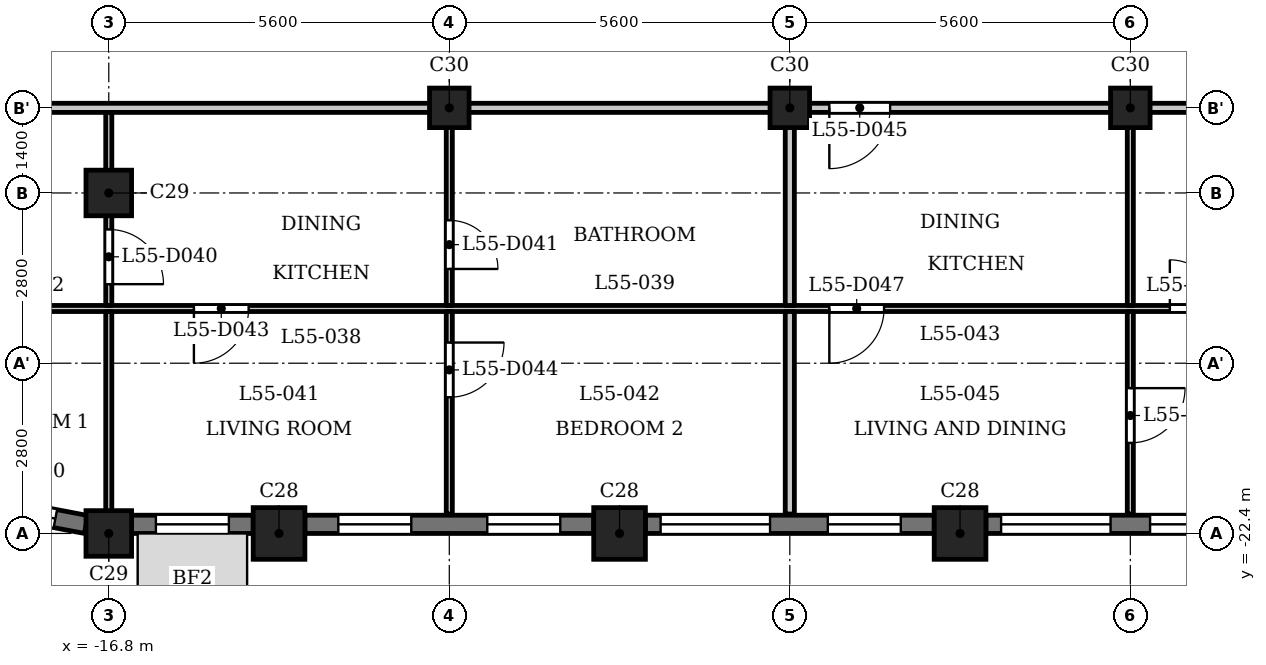
"""IFC4 building model, lengths in metres.
Left out: names, types, materials, properties, quantities, classifications, styles, units other than length and angle.
Written with IfcOpenShell. Run it as: python <this file> out.ifc"""

import sys

from ifc_helpers import new_model, si_unit, direction, frame, frame_2d, origin, origin_2d, place, context, subcontext, project, spatial, rectangle, extrude, element, fill, save


model = new_model("IFC4")
c1 = context("Model", 3, precision=1e-05, world=origin(), true_north=direction((0.0, 1.0)))
c2 = subcontext(c1, "Body", "Model", "MODEL_VIEW")
j1 = project(units=[si_unit("LENGTHUNIT", "METRE"), si_unit("PLANEANGLEUNIT", "RADIAN")], contexts=[c1])
p1 = place(None, origin())
s1 = spatial("IfcSite", under=j1, at=p1, CompositionType="ELEMENT")
p2 = place(p1, origin())
s2 = spatial("IfcBuilding", under=s1, at=p2, CompositionType="ELEMENT")
p3 = place(p2, frame((0.0, 0.0, 213.4)))
s3 = spatial("IfcBuildingStorey", under=s2, at=p3, CompositionType="ELEMENT", Elevation=213.4)
for number, where, z_axis, x_axis in (
    (1, (-14.0, -22.4, 0.0), (0.0, 0.0, 1.0), (1.0, 0.0, 0.0)),
    (2, (-8.4, -22.4, 0.0), (0.0, 0.0, 1.0), (1.0, 0.0, 0.0)),
    (3, (-2.8, -22.4, 0.0), (0.0, 0.0, 1.0), (1.0, 0.0, 0.0)),
):
    element("IfcColumn", number, at=place(p3, frame(where, z_axis=z_axis, x_axis=x_axis)), inside=s3, PredefinedType="COLUMN", context=c2, shape_type="SweptSolid", body=[
        extrude(rectangle(XDim=0.85, YDim=0.85, at=origin_2d()), origin(), (0.0, 0.0, 1.0), 3.5),
    ])
for number, where, z_axis, x_axis in (
    (4, (-16.8, -22.4, 0.0), (0.0, 0.0, 1.0), (1.0, 0.0, 0.0)),
    (5, (-16.8, -16.8, 0.0), (0.0, 0.0, 1.0), (1.0, 0.0, 0.0)),
):
    element("IfcColumn", number, at=place(p3, frame(where, z_axis=z_axis, x_axis=x_axis)), inside=s3, PredefinedType="COLUMN", context=c2, shape_type="SweptSolid", body=[
        extrude(rectangle(XDim=0.75, YDim=0.75, at=origin_2d()), origin(), (0.0, 0.0, 1.0), 3.5),
    ])
for number, where, z_axis, x_axis in (
    (6, (-11.2, -15.4, 0.0), (0.0, 0.0, 1.0), (1.0, 0.0, 0.0)),
    (7, (-5.6, -15.4, 0.0), (0.0, 0.0, 1.0), (1.0, 0.0, 0.0)),
    (8, (0.0, -15.4, 0.0), (0.0, 0.0, 1.0), (1.0, 0.0, 0.0)),
):
    element("IfcColumn", number, at=place(p3, frame(where, z_axis=z_axis, x_axis=x_axis)), inside=s3, PredefinedType="COLUMN", context=c2, shape_type="SweptSolid", body=[
        extrude(rectangle(XDim=0.65, YDim=0.65, at=origin_2d()), origin(), (0.0, 0.0, 1.0), 3.5),
    ])
p4 = place(p3, frame((-18.971, -21.91, 0.0), z_axis=(0.0, 0.0, 1.0), x_axis=(0.982300037503, -0.187314271538, 0.0)))
e9 = element("IfcWall", 9, at=p4, inside=s3, PredefinedType="SOLIDWALL", context=c2, shape_type="SweptSolid", body=[
    extrude(rectangle(XDim=1.831, YDim=0.3, at=frame_2d((0.916, 0.0))), origin(), (0.0, 0.0, 1.0), 2.5),
])
p5 = place(p4, frame((0.516, 0.0, 0.6)))
e10 = element("IfcOpeningElement", 10, at=p5, cuts=e9, PredefinedType="OPENING", context=c2, shape_type="SweptSolid", body=[
    extrude(rectangle(XDim=0.8, YDim=1.55, at=frame_2d((0.4, 0.775))), frame((0.0, 0.16, 0.0), z_axis=(0.0, -1.0, 0.0), x_axis=(1.0, 0.0, 0.0)), (0.0, 0.0, 1.0), 0.32),
])
p6 = place(p3, frame((-16.425, -22.25, 0.0), z_axis=(0.0, 0.0, 1.0), x_axis=(1.0, 0.0, 0.0)))
e11 = element("IfcWall", 11, at=p6, inside=s3, PredefinedType="SOLIDWALL", context=c2, shape_type="SweptSolid", body=[
    extrude(rectangle(XDim=2.0, YDim=0.3, at=frame_2d((1.0, 0.0))), origin(), (0.0, 0.0, 1.0), 2.5),
])
p7 = place(p6, frame((0.4, 0.0, 0.6)))
e12 = element("IfcOpeningElement", 12, at=p7, cuts=e11, PredefinedType="OPENING", context=c2, shape_type="SweptSolid", body=[
    extrude(rectangle(XDim=1.2, YDim=1.55, at=frame_2d((0.6, 0.775))), frame((0.0, 0.16, 0.0), z_axis=(0.0, -1.0, 0.0), x_axis=(1.0, 0.0, 0.0)), (0.0, 0.0, 1.0), 0.32),
])
p8 = place(p3, frame((-13.575, -22.25, 0.0), z_axis=(0.0, 0.0, 1.0), x_axis=(1.0, 0.0, 0.0)))
e13 = element("IfcWall", 13, at=p8, inside=s3, PredefinedType="SOLIDWALL", context=c2, shape_type="SweptSolid", body=[
    extrude(rectangle(XDim=4.75, YDim=0.3, at=frame_2d((2.375, 0.0))), origin(), (0.0, 0.0, 1.0), 2.5),
])
p9 = place(p8, frame((0.55, 0.0, 0.6)))
e14 = element("IfcOpeningElement", 14, at=p9, cuts=e13, PredefinedType="OPENING", context=c2, shape_type="SweptSolid", body=[
    extrude(rectangle(XDim=1.2, YDim=1.55, at=frame_2d((0.6, 0.775))), frame((0.0, 0.16, 0.0), z_axis=(0.0, -1.0, 0.0), x_axis=(1.0, 0.0, 0.0)), (0.0, 0.0, 1.0), 0.32),
])
p10 = place(p8, frame((3.0, 0.0, 0.6)))
e15 = element("IfcOpeningElement", 15, at=p10, cuts=e13, PredefinedType="OPENING", context=c2, shape_type="SweptSolid", body=[
    extrude(rectangle(XDim=1.2, YDim=1.55, at=frame_2d((0.6, 0.775))), frame((0.0, 0.16, 0.0), z_axis=(0.0, -1.0, 0.0), x_axis=(1.0, 0.0, 0.0)), (0.0, 0.0, 1.0), 0.32),
])
p11 = place(p3, frame((-7.975, -22.25, 0.0), z_axis=(0.0, 0.0, 1.0), x_axis=(1.0, 0.0, 0.0)))
e16 = element("IfcWall", 16, at=p11, inside=s3, PredefinedType="SOLIDWALL", context=c2, shape_type="SweptSolid", body=[
    extrude(rectangle(XDim=4.75, YDim=0.3, at=frame_2d((2.375, 0.0))), origin(), (0.0, 0.0, 1.0), 2.5),
])
p12 = place(p11, frame((0.25, 0.0, 0.9)))
e17 = element("IfcOpeningElement", 17, at=p12, cuts=e16, PredefinedType="OPENING", context=c2, shape_type="SweptSolid", body=[
    extrude(rectangle(XDim=1.8, YDim=1.25, at=frame_2d((0.9, 0.625))), frame((0.0, 0.16, 0.0), z_axis=(0.0, -1.0, 0.0), x_axis=(1.0, 0.0, 0.0)), (0.0, 0.0, 1.0), 0.32),
])
p13 = place(p11, frame((3.0, 0.0, 0.6)))
e18 = element("IfcOpeningElement", 18, at=p13, cuts=e16, PredefinedType="OPENING", context=c2, shape_type="SweptSolid", body=[
    extrude(rectangle(XDim=1.2, YDim=1.55, at=frame_2d((0.6, 0.775))), frame((0.0, 0.16, 0.0), z_axis=(0.0, -1.0, 0.0), x_axis=(1.0, 0.0, 0.0)), (0.0, 0.0, 1.0), 0.32),
])
p14 = place(p3, frame((-2.375, -22.25, 0.0), z_axis=(0.0, 0.0, 1.0), x_axis=(1.0, 0.0, 0.0)))
e19 = element("IfcWall", 19, at=p14, inside=s3, PredefinedType="SOLIDWALL", context=c2, shape_type="SweptSolid", body=[
    extrude(rectangle(XDim=4.75, YDim=0.3, at=frame_2d((2.375, 0.0))), origin(), (0.0, 0.0, 1.0), 2.5),
])
p15 = place(p14, frame((0.25, 0.0, 0.9)))
e20 = element("IfcOpeningElement", 20, at=p15, cuts=e19, PredefinedType="OPENING", context=c2, shape_type="SweptSolid", body=[
    extrude(rectangle(XDim=1.8, YDim=1.25, at=frame_2d((0.9, 0.625))), frame((0.0, 0.16, 0.0), z_axis=(0.0, -1.0, 0.0), x_axis=(1.0, 0.0, 0.0)), (0.0, 0.0, 1.0), 0.32),
])
p16 = place(p14, frame((2.7, 0.0, 0.9)))
e21 = element("IfcOpeningElement", 21, at=p16, cuts=e19, PredefinedType="OPENING", context=c2, shape_type="SweptSolid", body=[
    extrude(rectangle(XDim=1.8, YDim=1.25, at=frame_2d((0.9, 0.625))), frame((0.0, 0.16, 0.0), z_axis=(0.0, -1.0, 0.0), x_axis=(1.0, 0.0, 0.0)), (0.0, 0.0, 1.0), 0.32),
])
p17 = place(p3, frame((-22.856, -18.7, 0.0), z_axis=(0.0, 0.0, 1.0), x_axis=(1.0, 0.0, 0.0)))
e22 = element("IfcWall", 22, at=p17, inside=s3, PredefinedType="PARTITIONING", context=c2, shape_type="SweptSolid", body=[
    extrude(rectangle(XDim=45.711, YDim=0.1, at=frame_2d((22.856, 0.0))), origin(), (0.0, 0.0, 1.0), 3.2),
])
p18 = place(p17, frame((4.084, 0.0, 0.0)))
e23 = element("IfcOpeningElement", 23, at=p18, cuts=e22, PredefinedType="OPENING", context=c2, shape_type="SweptSolid", body=[
    extrude(rectangle(XDim=0.9, YDim=2.1, at=frame_2d((0.45, 1.05))), frame((0.0, 0.06, 0.0), z_axis=(0.0, -1.0, 0.0), x_axis=(1.0, 0.0, 0.0)), (0.0, 0.0, 1.0), 0.12),
])
p19 = place(p17, frame((7.456, 0.0, 0.0)))
e24 = element("IfcOpeningElement", 24, at=p19, cuts=e22, PredefinedType="OPENING", context=c2, shape_type="SweptSolid", body=[
    extrude(rectangle(XDim=0.9, YDim=2.1, at=frame_2d((0.45, 1.05))), frame((0.0, 0.06, 0.0), z_axis=(0.0, -1.0, 0.0), x_axis=(1.0, 0.0, 0.0)), (0.0, 0.0, 1.0), 0.12),
])
p20 = place(p17, frame((23.506, 0.0, 0.0)))
e25 = element("IfcOpeningElement", 25, at=p20, cuts=e22, PredefinedType="OPENING", context=c2, shape_type="SweptSolid", body=[
    extrude(rectangle(XDim=0.8, YDim=2.1, at=frame_2d((0.4, 1.05))), frame((0.0, 0.06, 0.0), z_axis=(0.0, -1.0, 0.0), x_axis=(1.0, 0.0, 0.0)), (0.0, 0.0, 1.0), 0.12),
])
p21 = place(p17, frame((17.906, 0.0, 0.0)))
e26 = element("IfcOpeningElement", 26, at=p21, cuts=e22, PredefinedType="OPENING", context=c2, shape_type="SweptSolid", body=[
    extrude(rectangle(XDim=0.9, YDim=2.1, at=frame_2d((0.45, 1.05))), frame((0.0, 0.06, 0.0), z_axis=(0.0, -1.0, 0.0), x_axis=(1.0, 0.0, 0.0)), (0.0, 0.0, 1.0), 0.12),
])
p22 = place(p17, frame((43.806, 0.0, 0.0)))
e27 = element("IfcOpeningElement", 27, at=p22, cuts=e22, PredefinedType="OPENING", context=c2, shape_type="SweptSolid", body=[
    extrude(rectangle(XDim=0.9, YDim=2.1, at=frame_2d((0.45, 1.05))), frame((0.0, 0.06, 0.0), z_axis=(0.0, -1.0, 0.0), x_axis=(1.0, 0.0, 0.0)), (0.0, 0.0, 1.0), 0.12),
])
p23 = place(p17, frame((34.706, 0.0, 0.0)))
e28 = element("IfcOpeningElement", 28, at=p23, cuts=e22, PredefinedType="OPENING", context=c2, shape_type="SweptSolid", body=[
    extrude(rectangle(XDim=0.9, YDim=2.1, at=frame_2d((0.45, 1.05))), frame((0.0, 0.06, 0.0), z_axis=(0.0, -1.0, 0.0), x_axis=(1.0, 0.0, 0.0)), (0.0, 0.0, 1.0), 0.12),
])
p24 = place(p3, frame((-24.684, -15.4, 0.0), z_axis=(0.0, 0.0, 1.0), x_axis=(1.0, 0.0, 0.0)))
e29 = element("IfcWall", 29, at=p24, inside=s3, PredefinedType="PARTITIONING", context=c2, shape_type="SweptSolid", body=[
    extrude(rectangle(XDim=49.368, YDim=0.15, at=frame_2d((24.684, 0.0))), origin(), (0.0, 0.0, 1.0), 3.2),
])
p25 = place(p24, frame((1.143, 0.0, 0.0)))
e30 = element("IfcOpeningElement", 30, at=p25, cuts=e29, PredefinedType="OPENING", context=c2, shape_type="SweptSolid", body=[
    extrude(rectangle(XDim=1.0, YDim=2.1, at=frame_2d((0.5, 1.05))), frame((0.0, 0.085, 0.0), z_axis=(0.0, -1.0, 0.0), x_axis=(1.0, 0.0, 0.0)), (0.0, 0.0, 1.0), 0.17),
])
p26 = place(p24, frame((19.734, 0.0, 0.0)))
e31 = element("IfcOpeningElement", 31, at=p26, cuts=e29, PredefinedType="OPENING", context=c2, shape_type="SweptSolid", body=[
    extrude(rectangle(XDim=1.0, YDim=2.1, at=frame_2d((0.5, 1.05))), frame((0.0, 0.085, 0.0), z_axis=(0.0, -1.0, 0.0), x_axis=(1.0, 0.0, 0.0)), (0.0, 0.0, 1.0), 0.17),
])
p27 = place(p24, frame((42.134, 0.0, 0.0)))
e32 = element("IfcOpeningElement", 32, at=p27, cuts=e29, PredefinedType="OPENING", context=c2, shape_type="SweptSolid", body=[
    extrude(rectangle(XDim=1.0, YDim=2.1, at=frame_2d((0.5, 1.05))), frame((0.0, 0.085, 0.0), z_axis=(0.0, -1.0, 0.0), x_axis=(1.0, 0.0, 0.0)), (0.0, 0.0, 1.0), 0.17),
])
p28 = place(p3, frame((-16.8, -22.31, 0.0), z_axis=(0.0, 0.0, 1.0), x_axis=(0.0, 1.0, 0.0)))
e33 = element("IfcWall", 33, at=p28, inside=s3, PredefinedType="PARTITIONING", context=c2, shape_type="SweptSolid", body=[
    extrude(rectangle(XDim=3.56, YDim=0.1, at=frame_2d((1.78, 0.0))), origin(), (0.0, 0.0, 1.0), 2.55),
])
p29 = place(p3, frame((-16.8, -18.65, 0.0), z_axis=(0.0, 0.0, 1.0), x_axis=(0.0, 1.0, 0.0)))
e34 = element("IfcWall", 34, at=p29, inside=s3, PredefinedType="PARTITIONING", context=c2, shape_type="SweptSolid", body=[
    extrude(rectangle(XDim=3.175, YDim=0.1, at=frame_2d((1.587, 0.0))), origin(), (0.0, 0.0, 1.0), 2.55),
])
p30 = place(p29, frame((0.35, 0.0, 0.0)))
e35 = element("IfcOpeningElement", 35, at=p30, cuts=e34, PredefinedType="OPENING", context=c2, shape_type="SweptSolid", body=[
    extrude(rectangle(XDim=0.9, YDim=2.1, at=frame_2d((0.45, 1.05))), frame((0.0, 0.06, 0.0), z_axis=(0.0, -1.0, 0.0), x_axis=(1.0, 0.0, 0.0)), (0.0, 0.0, 1.0), 0.12),
])
p31 = place(p3, frame((-11.2, -22.08, 0.0), z_axis=(0.0, 0.0, 1.0), x_axis=(0.0, 1.0, 0.0)))
e36 = element("IfcWall", 36, at=p31, inside=s3, PredefinedType="PARTITIONING", context=c2, shape_type="SweptSolid", body=[
    extrude(rectangle(XDim=3.33, YDim=0.1, at=frame_2d((1.665, 0.0))), origin(), (0.0, 0.0, 1.0), 3.2),
])
p32 = place(p31, frame((1.92, 0.0, 0.0)))
e37 = element("IfcOpeningElement", 37, at=p32, cuts=e36, PredefinedType="OPENING", context=c2, shape_type="SweptSolid", body=[
    extrude(rectangle(XDim=0.9, YDim=2.1, at=frame_2d((0.45, 1.05))), frame((0.0, 0.06, 0.0), z_axis=(0.0, -1.0, 0.0), x_axis=(1.0, 0.0, 0.0)), (0.0, 0.0, 1.0), 0.12),
])
p33 = place(p3, frame((-11.2, -18.65, 0.0), z_axis=(0.0, 0.0, 1.0), x_axis=(0.0, 1.0, 0.0)))
e38 = element("IfcWall", 38, at=p33, inside=s3, PredefinedType="PARTITIONING", context=c2, shape_type="SweptSolid", body=[
    extrude(rectangle(XDim=3.175, YDim=0.1, at=frame_2d((1.587, 0.0))), origin(), (0.0, 0.0, 1.0), 3.2),
])
p34 = place(p33, frame((0.6, 0.0, 0.0)))
e39 = element("IfcOpeningElement", 39, at=p34, cuts=e38, PredefinedType="OPENING", context=c2, shape_type="SweptSolid", body=[
    extrude(rectangle(XDim=0.8, YDim=2.1, at=frame_2d((0.4, 1.05))), frame((0.0, 0.06, 0.0), z_axis=(0.0, -1.0, 0.0), x_axis=(1.0, 0.0, 0.0)), (0.0, 0.0, 1.0), 0.12),
])
p35 = place(p3, frame((-5.6, -22.08, 0.0), z_axis=(0.0, 0.0, 1.0), x_axis=(0.0, 1.0, 0.0)))
e40 = element("IfcWall", 40, at=p35, inside=s3, PredefinedType="PARTITIONING", context=c2, shape_type="SweptSolid", body=[
    extrude(rectangle(XDim=3.33, YDim=0.15, at=frame_2d((1.665, 0.0))), origin(), (0.0, 0.0, 1.0), 3.2),
])
p36 = place(p3, frame((-5.6, -18.65, 0.0), z_axis=(0.0, 0.0, 1.0), x_axis=(0.0, 1.0, 0.0)))
e41 = element("IfcWall", 41, at=p36, inside=s3, PredefinedType="PARTITIONING", context=c2, shape_type="SweptSolid", body=[
    extrude(rectangle(XDim=3.175, YDim=0.15, at=frame_2d((1.587, 0.0))), origin(), (0.0, 0.0, 1.0), 3.2),
])
p37 = place(p3, frame((0.0, -22.08, 0.0), z_axis=(0.0, 0.0, 1.0), x_axis=(0.0, 1.0, 0.0)))
e42 = element("IfcWall", 42, at=p37, inside=s3, PredefinedType="PARTITIONING", context=c2, shape_type="SweptSolid", body=[
    extrude(rectangle(XDim=3.33, YDim=0.1, at=frame_2d((1.665, 0.0))), origin(), (0.0, 0.0, 1.0), 3.2),
])
p38 = place(p37, frame((1.17, 0.0, 0.0)))
e43 = element("IfcOpeningElement", 43, at=p38, cuts=e42, PredefinedType="OPENING", context=c2, shape_type="SweptSolid", body=[
    extrude(rectangle(XDim=0.9, YDim=2.1, at=frame_2d((0.45, 1.05))), frame((0.0, 0.06, 0.0), z_axis=(0.0, -1.0, 0.0), x_axis=(1.0, 0.0, 0.0)), (0.0, 0.0, 1.0), 0.12),
])
p39 = place(p3, frame((0.0, -18.65, 0.0), z_axis=(0.0, 0.0, 1.0), x_axis=(0.0, 1.0, 0.0)))
e44 = element("IfcWall", 44, at=p39, inside=s3, PredefinedType="PARTITIONING", context=c2, shape_type="SweptSolid", body=[
    extrude(rectangle(XDim=3.175, YDim=0.1, at=frame_2d((1.587, 0.0))), origin(), (0.0, 0.0, 1.0), 3.2),
])
p40 = place(p30, origin())
e45 = element("IfcDoor", 45, at=p40, inside=s3, OperationType="SINGLE_SWING_LEFT", PredefinedType="DOOR", context=c2, shape_type="SweptSolid", body=[
    extrude(rectangle(XDim=0.9, YDim=2.1, at=frame_2d((0.45, 1.05))), frame((0.0, 0.025, 0.0), z_axis=(0.0, -1.0, 0.0), x_axis=(1.0, 0.0, 0.0)), (0.0, 0.0, 1.0), 0.05),
])
fill(e35, e45)
p41 = place(p34, origin())
e46 = element("IfcDoor", 46, at=p41, inside=s3, OperationType="SINGLE_SWING_LEFT", PredefinedType="DOOR", context=c2, shape_type="SweptSolid", body=[
    extrude(rectangle(XDim=0.8, YDim=2.1, at=frame_2d((0.4, 1.05))), frame((0.0, 0.025, 0.0), z_axis=(0.0, -1.0, 0.0), x_axis=(1.0, 0.0, 0.0)), (0.0, 0.0, 1.0), 0.05),
])
fill(e39, e46)
p42 = place(p19, origin())
e47 = element("IfcDoor", 47, at=p42, inside=s3, OperationType="SINGLE_SWING_LEFT", PredefinedType="DOOR", context=c2, shape_type="SweptSolid", body=[
    extrude(rectangle(XDim=0.9, YDim=2.1, at=frame_2d((0.45, 1.05))), frame((0.0, 0.025, 0.0), z_axis=(0.0, -1.0, 0.0), x_axis=(1.0, 0.0, 0.0)), (0.0, 0.0, 1.0), 0.05),
])
fill(e24, e47)
p43 = place(p32, origin())
e48 = element("IfcDoor", 48, at=p43, inside=s3, OperationType="SINGLE_SWING_RIGHT", PredefinedType="DOOR", context=c2, shape_type="SweptSolid", body=[
    extrude(rectangle(XDim=0.9, YDim=2.1, at=frame_2d((0.45, 1.05))), frame((0.0, 0.025, 0.0), z_axis=(0.0, -1.0, 0.0), x_axis=(1.0, 0.0, 0.0)), (0.0, 0.0, 1.0), 0.05),
])
fill(e37, e48)
p44 = place(p26, origin())
e49 = element("IfcDoor", 49, at=p44, inside=s3, OperationType="SINGLE_SWING_LEFT", PredefinedType="DOOR", context=c2, shape_type="SweptSolid", body=[
    extrude(rectangle(XDim=1.0, YDim=2.1, at=frame_2d((0.5, 1.05))), frame((0.0, 0.025, 0.0), z_axis=(0.0, -1.0, 0.0), x_axis=(1.0, 0.0, 0.0)), (0.0, 0.0, 1.0), 0.05),
])
fill(e31, e49)
p45 = place(p20, origin())
e50 = element("IfcDoor", 50, at=p45, inside=s3, OperationType="SINGLE_SWING_RIGHT", PredefinedType="DOOR", context=c2, shape_type="SweptSolid", body=[
    extrude(rectangle(XDim=0.8, YDim=2.1, at=frame_2d((0.4, 1.05))), frame((0.0, 0.025, 0.0), z_axis=(0.0, -1.0, 0.0), x_axis=(1.0, 0.0, 0.0)), (0.0, 0.0, 1.0), 0.05),
])
fill(e25, e50)
p46 = place(p21, origin())
e51 = element("IfcDoor", 51, at=p46, inside=s3, OperationType="SINGLE_SWING_LEFT", PredefinedType="DOOR", context=c2, shape_type="SweptSolid", body=[
    extrude(rectangle(XDim=0.9, YDim=2.1, at=frame_2d((0.45, 1.05))), frame((0.0, 0.025, 0.0), z_axis=(0.0, -1.0, 0.0), x_axis=(1.0, 0.0, 0.0)), (0.0, 0.0, 1.0), 0.05),
])
fill(e26, e51)
p47 = place(p38, origin())
e52 = element("IfcDoor", 52, at=p47, inside=s3, OperationType="SINGLE_SWING_RIGHT", PredefinedType="DOOR", context=c2, shape_type="SweptSolid", body=[
    extrude(rectangle(XDim=0.9, YDim=2.1, at=frame_2d((0.45, 1.05))), frame((0.0, 0.025, 0.0), z_axis=(0.0, -1.0, 0.0), x_axis=(1.0, 0.0, 0.0)), (0.0, 0.0, 1.0), 0.05),
])
fill(e43, e52)
p48 = place(p5, origin())
e53 = element("IfcWindow", 53, at=p48, inside=s3, PartitioningType="SINGLE_PANEL", PredefinedType="WINDOW", context=c2, shape_type="SweptSolid", body=[
    extrude(rectangle(XDim=0.8, YDim=1.55, at=frame_2d((0.4, 0.775))), frame((0.0, 0.03, 0.0), z_axis=(0.0, -1.0, 0.0), x_axis=(1.0, 0.0, 0.0)), (0.0, 0.0, 1.0), 0.06),
])
fill(e10, e53)
p49 = place(p7, origin())
e54 = element("IfcWindow", 54, at=p49, inside=s3, PartitioningType="SINGLE_PANEL", PredefinedType="WINDOW", context=c2, shape_type="SweptSolid", body=[
    extrude(rectangle(XDim=1.2, YDim=1.55, at=frame_2d((0.6, 0.775))), frame((0.0, 0.03, 0.0), z_axis=(0.0, -1.0, 0.0), x_axis=(1.0, 0.0, 0.0)), (0.0, 0.0, 1.0), 0.06),
])
fill(e12, e54)
p50 = place(p9, origin())
e55 = element("IfcWindow", 55, at=p50, inside=s3, PartitioningType="SINGLE_PANEL", PredefinedType="WINDOW", context=c2, shape_type="SweptSolid", body=[
    extrude(rectangle(XDim=1.2, YDim=1.55, at=frame_2d((0.6, 0.775))), frame((0.0, 0.03, 0.0), z_axis=(0.0, -1.0, 0.0), x_axis=(1.0, 0.0, 0.0)), (0.0, 0.0, 1.0), 0.06),
])
fill(e14, e55)
p51 = place(p10, origin())
e56 = element("IfcWindow", 56, at=p51, inside=s3, PartitioningType="SINGLE_PANEL", PredefinedType="WINDOW", context=c2, shape_type="SweptSolid", body=[
    extrude(rectangle(XDim=1.2, YDim=1.55, at=frame_2d((0.6, 0.775))), frame((0.0, 0.03, 0.0), z_axis=(0.0, -1.0, 0.0), x_axis=(1.0, 0.0, 0.0)), (0.0, 0.0, 1.0), 0.06),
])
fill(e15, e56)
p52 = place(p12, origin())
e57 = element("IfcWindow", 57, at=p52, inside=s3, PartitioningType="SINGLE_PANEL", PredefinedType="WINDOW", context=c2, shape_type="SweptSolid", body=[
    extrude(rectangle(XDim=1.8, YDim=1.25, at=frame_2d((0.9, 0.625))), frame((0.0, 0.03, 0.0), z_axis=(0.0, -1.0, 0.0), x_axis=(1.0, 0.0, 0.0)), (0.0, 0.0, 1.0), 0.06),
])
fill(e17, e57)
p53 = place(p13, origin())
e58 = element("IfcWindow", 58, at=p53, inside=s3, PartitioningType="SINGLE_PANEL", PredefinedType="WINDOW", context=c2, shape_type="SweptSolid", body=[
    extrude(rectangle(XDim=1.2, YDim=1.55, at=frame_2d((0.6, 0.775))), frame((0.0, 0.03, 0.0), z_axis=(0.0, -1.0, 0.0), x_axis=(1.0, 0.0, 0.0)), (0.0, 0.0, 1.0), 0.06),
])
fill(e18, e58)
p54 = place(p15, origin())
e59 = element("IfcWindow", 59, at=p54, inside=s3, PartitioningType="SINGLE_PANEL", PredefinedType="WINDOW", context=c2, shape_type="SweptSolid", body=[
    extrude(rectangle(XDim=1.8, YDim=1.25, at=frame_2d((0.9, 0.625))), frame((0.0, 0.03, 0.0), z_axis=(0.0, -1.0, 0.0), x_axis=(1.0, 0.0, 0.0)), (0.0, 0.0, 1.0), 0.06),
])
fill(e20, e59)
p55 = place(p16, origin())
e60 = element("IfcWindow", 60, at=p55, inside=s3, PartitioningType="SINGLE_PANEL", PredefinedType="WINDOW", context=c2, shape_type="SweptSolid", body=[
    extrude(rectangle(XDim=1.8, YDim=1.25, at=frame_2d((0.9, 0.625))), frame((0.0, 0.03, 0.0), z_axis=(0.0, -1.0, 0.0), x_axis=(1.0, 0.0, 0.0)), (0.0, 0.0, 1.0), 0.06),
])
fill(e21, e60)
save(model, sys.argv[1])
